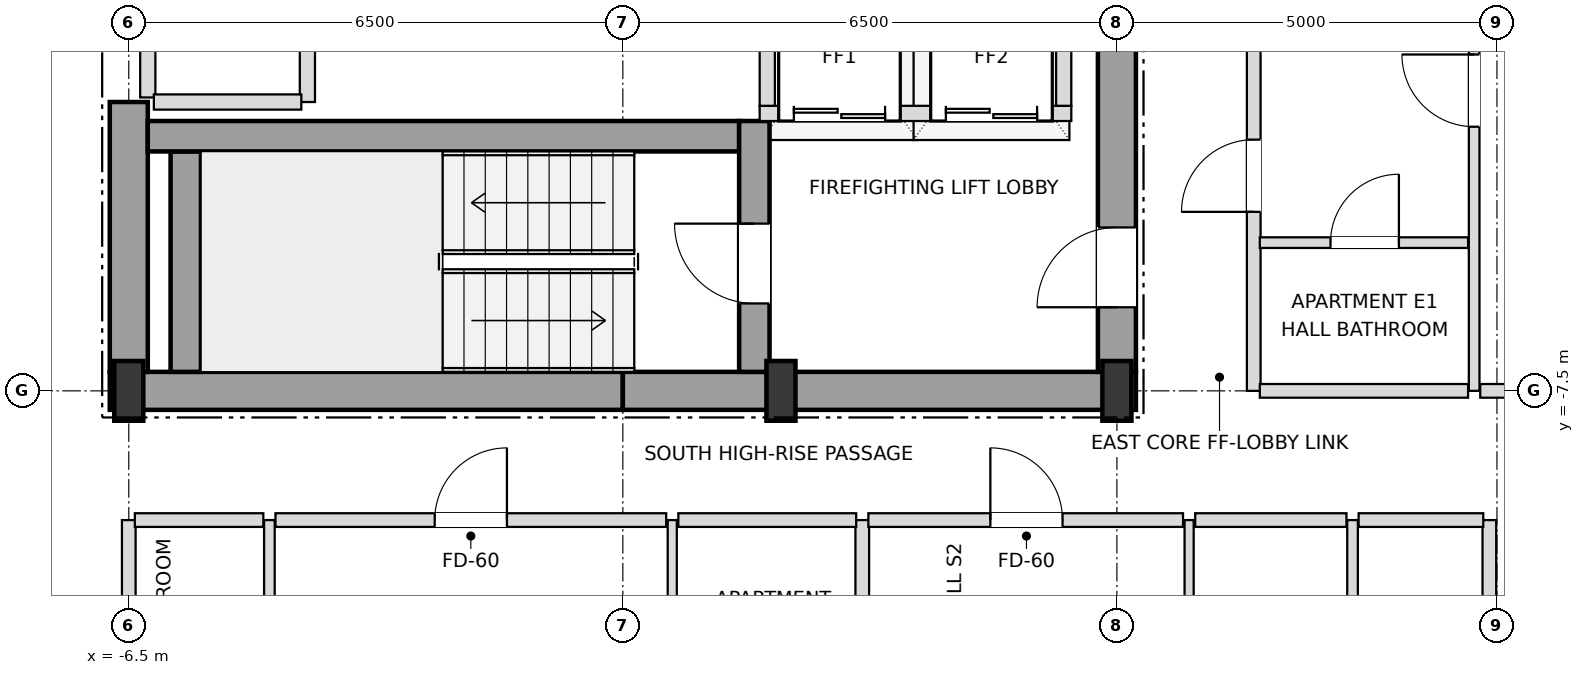
"""IFC4 building model, lengths in metres.
Left out: names, types, materials, properties, quantities, classifications, styles, units other than length and angle.
Written with IfcOpenShell. Run it as: python <this file> out.ifc"""

import sys

from ifc_helpers import new_model, si_unit, direction, frame, frame_2d, origin, origin_2d, place, context, subcontext, project, spatial, rectangle, i_section, extrude, element, fill, save


model = new_model("IFC4")
c1 = context("Model", 3, precision=1e-05, world=origin(), true_north=direction((0.0, 1.0)))
c2 = subcontext(c1, "Body", "Model", "MODEL_VIEW")
j1 = project(units=[si_unit("LENGTHUNIT", "METRE"), si_unit("PLANEANGLEUNIT", "RADIAN")], contexts=[c1])
p1 = place(None, origin())
s1 = spatial("IfcSite", under=j1, at=p1, CompositionType="ELEMENT")
p2 = place(p1, origin())
s2 = spatial("IfcBuilding", under=s1, at=p2, CompositionType="ELEMENT")
p3 = place(p2, frame((0.0, 0.0, 240.3)))
s3 = spatial("IfcBuildingStorey", under=s2, at=p3, CompositionType="ELEMENT", Elevation=240.3)
for number, where, z_axis, x_axis in (
    (1, (-6.5, -7.5, 0.0), (0.0, 0.0, 1.0), (1.0, 0.0, 0.0)),
    (2, (2.08, -7.5, 0.0), (0.0, 0.0, 1.0), (1.0, 0.0, 0.0)),
    (3, (6.5, -7.5, 0.0), (0.0, 0.0, 1.0), (1.0, 0.0, 0.0)),
):
    element("IfcColumn", number, at=place(p3, frame(where, z_axis=z_axis, x_axis=x_axis)), inside=s3, PredefinedType="COLUMN", context=c2, shape_type="SweptSolid", body=[
        extrude(i_section(OverallWidth=0.382, OverallDepth=0.786, WebThickness=0.02, FlangeThickness=0.033, at=origin_2d()), origin(), (0.0, 0.0, 1.0), 3.6),
    ])
for number, where, z_axis, x_axis in (
    (4, (-6.75, -7.5, 0.0), (0.0, 0.0, 1.0), (1.0, 0.0, 0.0)),
    (5, (0.0, -7.5, 0.0), (0.0, 0.0, 1.0), (1.0, 0.0, 0.0)),
):
    element("IfcWall", number, at=place(p3, frame(where, z_axis=z_axis, x_axis=x_axis)), inside=s3, PredefinedType="SHEAR", context=c2, shape_type="SweptSolid", body=[
        extrude(rectangle(XDim=6.75, YDim=0.5, at=frame_2d((3.375, 0.0))), origin(), (0.0, 0.0, 1.0), 3.38),
    ])
p4 = place(p3, frame((-6.5, -7.25, 0.0), z_axis=(0.0, 0.0, 1.0), x_axis=(0.0, 1.0, 0.0)))
e6 = element("IfcWall", 6, at=p4, inside=s3, PredefinedType="SHEAR", context=c2, shape_type="SweptSolid", body=[
    extrude(rectangle(XDim=3.55, YDim=0.5, at=frame_2d((1.775, 0.0))), origin(), (0.0, 0.0, 1.0), 3.38),
])
p5 = place(p3, frame((6.5, -7.25, 0.0), z_axis=(0.0, 0.0, 1.0), x_axis=(0.0, 1.0, 0.0)))
e7 = element("IfcWall", 7, at=p5, inside=s3, PredefinedType="SHEAR", context=c2, shape_type="SweptSolid", body=[
    extrude(rectangle(XDim=5.75, YDim=0.5, at=frame_2d((2.875, 0.0))), origin(), (0.0, 0.0, 1.0), 3.38),
])
p6 = place(p5, frame((0.85, 0.0, 0.0)))
e8 = element("IfcOpeningElement", 8, at=p6, cuts=e7, PredefinedType="OPENING", context=c2, shape_type="SweptSolid", body=[
    extrude(rectangle(XDim=1.05, YDim=2.15, at=frame_2d((0.525, 1.075))), frame((0.0, 0.26, 0.0), z_axis=(0.0, -1.0, 0.0), x_axis=(1.0, 0.0, 0.0)), (0.0, 0.0, 1.0), 0.52),
])
p7 = place(p3, frame((-5.75, -7.25, 0.0), z_axis=(0.0, 0.0, 1.0), x_axis=(0.0, 1.0, 0.0)))
e9 = element("IfcWall", 9, at=p7, inside=s3, PredefinedType="SHEAR", context=c2, shape_type="SweptSolid", body=[
    extrude(rectangle(XDim=2.9, YDim=0.4, at=frame_2d((1.45, 0.0))), origin(), (0.0, 0.0, 1.0), 3.38),
])
p8 = place(p3, frame((-6.25, -4.15, 0.0), z_axis=(0.0, 0.0, 1.0), x_axis=(1.0, 0.0, 0.0)))
e10 = element("IfcWall", 10, at=p8, inside=s3, PredefinedType="SHEAR", context=c2, shape_type="SweptSolid", body=[
    extrude(rectangle(XDim=7.78, YDim=0.4, at=frame_2d((3.89, 0.0))), origin(), (0.0, 0.0, 1.0), 3.38),
])
p9 = place(p3, frame((1.73, -7.25, 0.0), z_axis=(0.0, 0.0, 1.0), x_axis=(0.0, 1.0, 0.0)))
e11 = element("IfcWall", 11, at=p9, inside=s3, PredefinedType="SHEAR", context=c2, shape_type="SweptSolid", body=[
    extrude(rectangle(XDim=3.3, YDim=0.4, at=frame_2d((1.65, 0.0))), origin(), (0.0, 0.0, 1.0), 3.38),
])
p10 = place(p9, frame((0.9, 0.0, 0.0)))
e12 = element("IfcOpeningElement", 12, at=p10, cuts=e11, PredefinedType="OPENING", context=c2, shape_type="SweptSolid", body=[
    extrude(rectangle(XDim=1.05, YDim=2.15, at=frame_2d((0.525, 1.075))), frame((0.0, 0.21, 0.0), z_axis=(0.0, -1.0, 0.0), x_axis=(1.0, 0.0, 0.0)), (0.0, 0.0, 1.0), 0.42),
])
p11 = place(p3, frame((1.8, -3.85, 0.0), z_axis=(0.0, 0.0, 1.0), x_axis=(1.0, 0.0, 0.0)))
e13 = element("IfcWall", 13, at=p11, inside=s3, PredefinedType="SOLIDWALL", context=c2, shape_type="SweptSolid", body=[
    extrude(rectangle(XDim=4.1, YDim=0.2, at=frame_2d((2.05, 0.0))), origin(), (0.0, 0.0, 1.0), 3.38),
])
p12 = place(p11, frame((0.45, 0.0, 0.0)))
e14 = element("IfcOpeningElement", 14, at=p12, cuts=e13, PredefinedType="OPENING", context=c2, shape_type="SweptSolid", body=[
    extrude(rectangle(XDim=1.2, YDim=2.2, at=frame_2d((0.6, 1.1))), frame((0.0, 0.11, 0.0), z_axis=(0.0, -1.0, 0.0), x_axis=(1.0, 0.0, 0.0)), (0.0, 0.0, 1.0), 0.22),
])
p13 = place(p11, frame((2.45, 0.0, 0.0)))
e15 = element("IfcOpeningElement", 15, at=p13, cuts=e13, PredefinedType="OPENING", context=c2, shape_type="SweptSolid", body=[
    extrude(rectangle(XDim=1.2, YDim=2.2, at=frame_2d((0.6, 1.1))), frame((0.0, 0.11, 0.0), z_axis=(0.0, -1.0, 0.0), x_axis=(1.0, 0.0, 0.0)), (0.0, 0.0, 1.0), 0.22),
])
for number, where, z_axis, x_axis in (
    (16, (1.9, -3.75, 0.0), (0.0, 0.0, 1.0), (0.0, 1.0, 0.0)),
    (17, (5.8, -3.75, 0.0), (0.0, 0.0, 1.0), (0.0, 1.0, 0.0)),
):
    element("IfcWall", number, at=place(p3, frame(where, z_axis=z_axis, x_axis=x_axis)), inside=s3, PredefinedType="SOLIDWALL", context=c2, shape_type="SweptSolid", body=[
        extrude(rectangle(XDim=2.0, YDim=0.2, at=frame_2d((1.0, 0.0))), origin(), (0.0, 0.0, 1.0), 3.38),
    ])
p14 = place(p3, frame((-6.5, -19.9, 0.0), z_axis=(0.0, 0.0, 1.0), x_axis=(0.0, 1.0, 0.0)))
e18 = element("IfcWall", 18, at=p14, inside=s3, PredefinedType="PARTITIONING", context=c2, shape_type="SweptSolid", body=[
    extrude(rectangle(XDim=10.7, YDim=0.18, at=frame_2d((5.35, 0.0))), origin(), (0.0, 0.0, 1.0), 2.826),
])
p15 = place(p3, frame((-6.25, -3.64, 0.0), z_axis=(0.0, 0.0, 1.0), x_axis=(0.0, 1.0, 0.0)))
e19 = element("IfcWall", 19, at=p15, inside=s3, PredefinedType="SOLIDWALL", context=c2, shape_type="SweptSolid", body=[
    extrude(rectangle(XDim=7.34, YDim=0.2, at=frame_2d((3.67, 0.0))), origin(), (0.0, 0.0, 1.0), 3.38),
])
p16 = place(p3, frame((-4.65, -13.9, 0.0), z_axis=(0.0, 0.0, 1.0), x_axis=(0.0, 1.0, 0.0)))
e20 = element("IfcWall", 20, at=p16, inside=s3, PredefinedType="PARTITIONING", context=c2, shape_type="SweptSolid", body=[
    extrude(rectangle(XDim=4.7, YDim=0.14, at=frame_2d((2.35, 0.0))), origin(), (0.0, 0.0, 1.0), 3.38),
])
p17 = place(p16, frame((1.9, 0.0, 0.0)))
e21 = element("IfcOpeningElement", 21, at=p17, cuts=e20, PredefinedType="OPENING", context=c2, shape_type="SweptSolid", body=[
    extrude(rectangle(XDim=0.9, YDim=2.1, at=frame_2d((0.45, 1.05))), frame((0.0, 0.08, 0.0), z_axis=(0.0, -1.0, 0.0), x_axis=(1.0, 0.0, 0.0)), (0.0, 0.0, 1.0), 0.16),
])
p18 = place(p3, frame((-4.15, -3.7, 0.0), z_axis=(0.0, 0.0, 1.0), x_axis=(0.0, 1.0, 0.0)))
e22 = element("IfcWall", 22, at=p18, inside=s3, PredefinedType="SOLIDWALL", context=c2, shape_type="SweptSolid", body=[
    extrude(rectangle(XDim=7.4, YDim=0.2, at=frame_2d((3.7, 0.0))), origin(), (0.0, 0.0, 1.0), 3.38),
])
p19 = place(p18, frame((2.025, 0.0, 0.0)))
e23 = element("IfcOpeningElement", 23, at=p19, cuts=e22, PredefinedType="OPENING", context=c2, shape_type="SweptSolid", body=[
    extrude(rectangle(XDim=0.95, YDim=2.15, at=frame_2d((0.475, 1.075))), frame((0.0, 0.11, 0.0), z_axis=(0.0, -1.0, 0.0), x_axis=(1.0, 0.0, 0.0)), (0.0, 0.0, 1.0), 0.22),
])
p20 = place(p18, frame((5.775, 0.0, 0.0)))
e24 = element("IfcOpeningElement", 24, at=p20, cuts=e22, PredefinedType="OPENING", context=c2, shape_type="SweptSolid", body=[
    extrude(rectangle(XDim=0.95, YDim=2.15, at=frame_2d((0.475, 1.075))), frame((0.0, 0.11, 0.0), z_axis=(0.0, -1.0, 0.0), x_axis=(1.0, 0.0, 0.0)), (0.0, 0.0, 1.0), 0.22),
])
p21 = place(p3, frame((0.65, -13.9, 0.0), z_axis=(0.0, 0.0, 1.0), x_axis=(0.0, 1.0, 0.0)))
e25 = element("IfcWall", 25, at=p21, inside=s3, PredefinedType="PARTITIONING", context=c2, shape_type="SweptSolid", body=[
    extrude(rectangle(XDim=4.7, YDim=0.12, at=frame_2d((2.35, 0.0))), origin(), (0.0, 0.0, 1.0), 3.38),
])
p22 = place(p21, frame((1.875, 0.0, 0.0)))
e26 = element("IfcOpeningElement", 26, at=p22, cuts=e25, PredefinedType="OPENING", context=c2, shape_type="SweptSolid", body=[
    extrude(rectangle(XDim=0.95, YDim=2.1, at=frame_2d((0.475, 1.05))), frame((0.0, 0.07, 0.0), z_axis=(0.0, -1.0, 0.0), x_axis=(1.0, 0.0, 0.0)), (0.0, 0.0, 1.0), 0.14),
])
p23 = place(p3, frame((3.15, -19.9, 0.0), z_axis=(0.0, 0.0, 1.0), x_axis=(0.0, 1.0, 0.0)))
e27 = element("IfcWall", 27, at=p23, inside=s3, PredefinedType="PARTITIONING", context=c2, shape_type="SweptSolid", body=[
    extrude(rectangle(XDim=10.7, YDim=0.18, at=frame_2d((5.35, 0.0))), origin(), (0.0, 0.0, 1.0), 3.018),
])
p24 = place(p3, frame((7.45, -19.9, 0.0), z_axis=(0.0, 0.0, 1.0), x_axis=(0.0, 1.0, 0.0)))
e28 = element("IfcWall", 28, at=p24, inside=s3, PredefinedType="PARTITIONING", context=c2, shape_type="SweptSolid", body=[
    extrude(rectangle(XDim=10.7, YDim=0.12, at=frame_2d((5.35, 0.0))), origin(), (0.0, 0.0, 1.0), 2.826),
])
p25 = place(p24, frame((7.875, 0.0, 0.0)))
e29 = element("IfcOpeningElement", 29, at=p25, cuts=e28, PredefinedType="OPENING", context=c2, shape_type="SweptSolid", body=[
    extrude(rectangle(XDim=0.95, YDim=2.1, at=frame_2d((0.475, 1.05))), frame((0.0, 0.07, 0.0), z_axis=(0.0, -1.0, 0.0), x_axis=(1.0, 0.0, 0.0)), (0.0, 0.0, 1.0), 0.14),
])
p26 = place(p24, frame((2.55, 0.0, 0.0)))
e30 = element("IfcOpeningElement", 30, at=p26, cuts=e28, PredefinedType="OPENING", context=c2, shape_type="SweptSolid", body=[
    extrude(rectangle(XDim=0.9, YDim=2.1, at=frame_2d((0.45, 1.05))), frame((0.0, 0.07, 0.0), z_axis=(0.0, -1.0, 0.0), x_axis=(1.0, 0.0, 0.0)), (0.0, 0.0, 1.0), 0.14),
])
p27 = place(p3, frame((8.3, -7.5, 0.0), z_axis=(0.0, 0.0, 1.0), x_axis=(0.0, 1.0, 0.0)))
e31 = element("IfcWall", 31, at=p27, inside=s3, PredefinedType="PARTITIONING", context=c2, shape_type="SweptSolid", body=[
    extrude(rectangle(XDim=15.0, YDim=0.18, at=frame_2d((7.5, 0.0))), origin(), (0.0, 0.0, 1.0), 3.38),
])
p28 = place(p27, frame((2.355, 0.0, 0.0)))
e32 = element("IfcOpeningElement", 32, at=p28, cuts=e31, PredefinedType="OPENING", context=c2, shape_type="SweptSolid", body=[
    extrude(rectangle(XDim=0.95, YDim=2.15, at=frame_2d((0.475, 1.075))), frame((0.0, 0.1, 0.0), z_axis=(0.0, -1.0, 0.0), x_axis=(1.0, 0.0, 0.0)), (0.0, 0.0, 1.0), 0.2),
])
p29 = place(p3, frame((9.6, -13.9, 0.0), z_axis=(0.0, 0.0, 1.0), x_axis=(0.0, 1.0, 0.0)))
e33 = element("IfcWall", 33, at=p29, inside=s3, PredefinedType="PARTITIONING", context=c2, shape_type="SweptSolid", body=[
    extrude(rectangle(XDim=4.7, YDim=0.14, at=frame_2d((2.35, 0.0))), origin(), (0.0, 0.0, 1.0), 2.826),
])
p30 = place(p29, frame((1.9, 0.0, 0.0)))
e34 = element("IfcOpeningElement", 34, at=p30, cuts=e33, PredefinedType="OPENING", context=c2, shape_type="SweptSolid", body=[
    extrude(rectangle(XDim=0.9, YDim=2.1, at=frame_2d((0.45, 1.05))), frame((0.0, 0.08, 0.0), z_axis=(0.0, -1.0, 0.0), x_axis=(1.0, 0.0, 0.0)), (0.0, 0.0, 1.0), 0.16),
])
p31 = place(p3, frame((11.2, -7.5, 0.0), z_axis=(0.0, 0.0, 1.0), x_axis=(0.0, 1.0, 0.0)))
e35 = element("IfcWall", 35, at=p31, inside=s3, PredefinedType="PARTITIONING", context=c2, shape_type="SweptSolid", body=[
    extrude(rectangle(XDim=15.0, YDim=0.14, at=frame_2d((7.5, 0.0))), origin(), (0.0, 0.0, 1.0), 3.38),
])
p32 = place(p31, frame((3.475, 0.0, 0.0)))
e36 = element("IfcOpeningElement", 36, at=p32, cuts=e35, PredefinedType="OPENING", context=c2, shape_type="SweptSolid", body=[
    extrude(rectangle(XDim=0.95, YDim=2.1, at=frame_2d((0.475, 1.05))), frame((0.0, 0.08, 0.0), z_axis=(0.0, -1.0, 0.0), x_axis=(1.0, 0.0, 0.0)), (0.0, 0.0, 1.0), 0.16),
])
p33 = place(p3, frame((11.4, -14.27, 0.0), z_axis=(0.0, 0.0, 1.0), x_axis=(0.0, 1.0, 0.0)))
e37 = element("IfcWall", 37, at=p33, inside=s3, PredefinedType="PARTITIONING", context=c2, shape_type="SweptSolid", body=[
    extrude(rectangle(XDim=5.07, YDim=0.18, at=frame_2d((2.535, 0.0))), origin(), (0.0, 0.0, 1.0), 2.748),
])
p34 = place(p3, frame((-6.42, -9.2, 0.0), z_axis=(0.0, 0.0, 1.0), x_axis=(1.0, 0.0, 0.0)))
e38 = element("IfcWall", 38, at=p34, inside=s3, PredefinedType="PARTITIONING", context=c2, shape_type="SweptSolid", body=[
    extrude(rectangle(XDim=1.69, YDim=0.18, at=frame_2d((0.845, 0.0))), origin(), (0.0, 0.0, 1.0), 3.38),
])
p35 = place(p3, frame((-4.57, -9.2, 0.0), z_axis=(0.0, 0.0, 1.0), x_axis=(1.0, 0.0, 0.0)))
e39 = element("IfcWall", 39, at=p35, inside=s3, PredefinedType="PARTITIONING", context=c2, shape_type="SweptSolid", body=[
    extrude(rectangle(XDim=5.14, YDim=0.18, at=frame_2d((2.57, 0.0))), origin(), (0.0, 0.0, 1.0), 3.38),
])
p36 = place(p35, frame((2.095, 0.0, 0.0)))
e40 = element("IfcOpeningElement", 40, at=p36, cuts=e39, PredefinedType="OPENING", context=c2, shape_type="SweptSolid", body=[
    extrude(rectangle(XDim=0.95, YDim=2.15, at=frame_2d((0.475, 1.075))), frame((0.0, 0.1, 0.0), z_axis=(0.0, -1.0, 0.0), x_axis=(1.0, 0.0, 0.0)), (0.0, 0.0, 1.0), 0.2),
])
p37 = place(p3, frame((0.73, -9.2, 0.0), z_axis=(0.0, 0.0, 1.0), x_axis=(1.0, 0.0, 0.0)))
e41 = element("IfcWall", 41, at=p37, inside=s3, PredefinedType="PARTITIONING", context=c2, shape_type="SweptSolid", body=[
    extrude(rectangle(XDim=2.34, YDim=0.18, at=frame_2d((1.17, 0.0))), origin(), (0.0, 0.0, 1.0), 3.38),
])
p38 = place(p3, frame((3.23, -9.2, 0.0), z_axis=(0.0, 0.0, 1.0), x_axis=(1.0, 0.0, 0.0)))
e42 = element("IfcWall", 42, at=p38, inside=s3, PredefinedType="PARTITIONING", context=c2, shape_type="SweptSolid", body=[
    extrude(rectangle(XDim=4.14, YDim=0.18, at=frame_2d((2.07, 0.0))), origin(), (0.0, 0.0, 1.0), 2.826),
])
p39 = place(p38, frame((1.605, 0.0, 0.0)))
e43 = element("IfcOpeningElement", 43, at=p39, cuts=e42, PredefinedType="OPENING", context=c2, shape_type="SweptSolid", body=[
    extrude(rectangle(XDim=0.95, YDim=2.15, at=frame_2d((0.475, 1.075))), frame((0.0, 0.1, 0.0), z_axis=(0.0, -1.0, 0.0), x_axis=(1.0, 0.0, 0.0)), (0.0, 0.0, 1.0), 0.2),
])
p40 = place(p3, frame((7.53, -9.2, 0.0), z_axis=(0.0, 0.0, 1.0), x_axis=(1.0, 0.0, 0.0)))
e44 = element("IfcWall", 44, at=p40, inside=s3, PredefinedType="PARTITIONING", context=c2, shape_type="SweptSolid", body=[
    extrude(rectangle(XDim=1.99, YDim=0.18, at=frame_2d((0.995, 0.0))), origin(), (0.0, 0.0, 1.0), 3.38),
])
p41 = place(p3, frame((9.68, -9.2, 0.0), z_axis=(0.0, 0.0, 1.0), x_axis=(1.0, 0.0, 0.0)))
e45 = element("IfcWall", 45, at=p41, inside=s3, PredefinedType="PARTITIONING", context=c2, shape_type="SweptSolid", body=[
    extrude(rectangle(XDim=1.64, YDim=0.18, at=frame_2d((0.82, 0.0))), origin(), (0.0, 0.0, 1.0), 3.38),
])
p42 = place(p3, frame((8.38, -7.5, 0.0), z_axis=(0.0, 0.0, 1.0), x_axis=(1.0, 0.0, 0.0)))
e46 = element("IfcWall", 46, at=p42, inside=s3, PredefinedType="PARTITIONING", context=c2, shape_type="SweptSolid", body=[
    extrude(rectangle(XDim=2.74, YDim=0.18, at=frame_2d((1.37, 0.0))), origin(), (0.0, 0.0, 1.0), 2.826),
])
p43 = place(p3, frame((11.28, -7.5, 0.0), z_axis=(0.0, 0.0, 1.0), x_axis=(1.0, 0.0, 0.0)))
e47 = element("IfcWall", 47, at=p43, inside=s3, PredefinedType="PARTITIONING", context=c2, shape_type="SweptSolid", body=[
    extrude(rectangle(XDim=5.62, YDim=0.18, at=frame_2d((2.81, 0.0))), origin(), (0.0, 0.0, 1.0), 2.826),
])
p44 = place(p3, frame((8.38, -5.55, 0.0), z_axis=(0.0, 0.0, 1.0), x_axis=(1.0, 0.0, 0.0)))
e48 = element("IfcWall", 48, at=p44, inside=s3, PredefinedType="PARTITIONING", context=c2, shape_type="SweptSolid", body=[
    extrude(rectangle(XDim=2.74, YDim=0.14, at=frame_2d((1.37, 0.0))), origin(), (0.0, 0.0, 1.0), 3.38),
])
p45 = place(p44, frame((0.93, 0.0, 0.0)))
e49 = element("IfcOpeningElement", 49, at=p45, cuts=e48, PredefinedType="OPENING", context=c2, shape_type="SweptSolid", body=[
    extrude(rectangle(XDim=0.9, YDim=2.1, at=frame_2d((0.45, 1.05))), frame((0.0, 0.08, 0.0), z_axis=(0.0, -1.0, 0.0), x_axis=(1.0, 0.0, 0.0)), (0.0, 0.0, 1.0), 0.16),
])
p46 = place(p3, frame((-6.17, -3.7, 0.0), z_axis=(0.0, 0.0, 1.0), x_axis=(1.0, 0.0, 0.0)))
e50 = element("IfcWall", 50, at=p46, inside=s3, PredefinedType="SOLIDWALL", context=c2, shape_type="SweptSolid", body=[
    extrude(rectangle(XDim=1.94, YDim=0.2, at=frame_2d((0.97, 0.0))), origin(), (0.0, 0.0, 1.0), 3.38),
])
p47 = place(p6, origin())
e51 = element("IfcDoor", 51, at=p47, inside=s3, OperationType="SINGLE_SWING_LEFT", PredefinedType="DOOR", context=c2, shape_type="SweptSolid", body=[
    extrude(rectangle(XDim=1.05, YDim=2.15, at=frame_2d((0.525, 1.075))), frame((0.0, 0.025, 0.0), z_axis=(0.0, -1.0, 0.0), x_axis=(1.0, 0.0, 0.0)), (0.0, 0.0, 1.0), 0.05),
])
fill(e8, e51)
p48 = place(p10, origin())
e52 = element("IfcDoor", 52, at=p48, inside=s3, OperationType="SINGLE_SWING_RIGHT", PredefinedType="DOOR", context=c2, shape_type="SweptSolid", body=[
    extrude(rectangle(XDim=1.05, YDim=2.15, at=frame_2d((0.525, 1.075))), frame((0.0, 0.025, 0.0), z_axis=(0.0, -1.0, 0.0), x_axis=(1.0, 0.0, 0.0)), (0.0, 0.0, 1.0), 0.05),
])
fill(e12, e52)
p49 = place(p12, origin())
e53 = element("IfcDoor", 53, at=p49, inside=s3, OperationType="DOUBLE_DOOR_SLIDING", PredefinedType="DOOR", context=c2, shape_type="SweptSolid", body=[
    extrude(rectangle(XDim=1.2, YDim=2.2, at=frame_2d((0.6, 1.1))), frame((0.0, 0.025, 0.0), z_axis=(0.0, -1.0, 0.0), x_axis=(1.0, 0.0, 0.0)), (0.0, 0.0, 1.0), 0.05),
])
fill(e14, e53)
p50 = place(p13, origin())
e54 = element("IfcDoor", 54, at=p50, inside=s3, OperationType="DOUBLE_DOOR_SLIDING", PredefinedType="DOOR", context=c2, shape_type="SweptSolid", body=[
    extrude(rectangle(XDim=1.2, YDim=2.2, at=frame_2d((0.6, 1.1))), frame((0.0, 0.025, 0.0), z_axis=(0.0, -1.0, 0.0), x_axis=(1.0, 0.0, 0.0)), (0.0, 0.0, 1.0), 0.05),
])
fill(e15, e54)
p51 = place(p36, origin())
e55 = element("IfcDoor", 55, at=p51, inside=s3, OperationType="SINGLE_SWING_RIGHT", PredefinedType="DOOR", context=c2, shape_type="SweptSolid", body=[
    extrude(rectangle(XDim=0.95, YDim=2.15, at=frame_2d((0.475, 1.075))), frame((0.0, 0.025, 0.0), z_axis=(0.0, -1.0, 0.0), x_axis=(1.0, 0.0, 0.0)), (0.0, 0.0, 1.0), 0.05),
])
fill(e40, e55)
p52 = place(p39, origin())
e56 = element("IfcDoor", 56, at=p52, inside=s3, OperationType="SINGLE_SWING_LEFT", PredefinedType="DOOR", context=c2, shape_type="SweptSolid", body=[
    extrude(rectangle(XDim=0.95, YDim=2.15, at=frame_2d((0.475, 1.075))), frame((0.0, 0.025, 0.0), z_axis=(0.0, -1.0, 0.0), x_axis=(1.0, 0.0, 0.0)), (0.0, 0.0, 1.0), 0.05),
])
fill(e43, e56)
p53 = place(p45, origin())
e57 = element("IfcDoor", 57, at=p53, inside=s3, OperationType="SINGLE_SWING_RIGHT", PredefinedType="DOOR", context=c2, shape_type="SweptSolid", body=[
    extrude(rectangle(XDim=0.9, YDim=2.1, at=frame_2d((0.45, 1.05))), frame((0.0, 0.025, 0.0), z_axis=(0.0, -1.0, 0.0), x_axis=(1.0, 0.0, 0.0)), (0.0, 0.0, 1.0), 0.05),
])
fill(e49, e57)
p54 = place(p28, origin())
e58 = element("IfcDoor", 58, at=p54, inside=s3, OperationType="SINGLE_SWING_LEFT", PredefinedType="DOOR", context=c2, shape_type="SweptSolid", body=[
    extrude(rectangle(XDim=0.95, YDim=2.15, at=frame_2d((0.475, 1.075))), frame((0.0, 0.025, 0.0), z_axis=(0.0, -1.0, 0.0), x_axis=(1.0, 0.0, 0.0)), (0.0, 0.0, 1.0), 0.05),
])
fill(e32, e58)
p55 = place(p32, origin())
e59 = element("IfcDoor", 59, at=p55, inside=s3, OperationType="SINGLE_SWING_RIGHT", PredefinedType="DOOR", context=c2, shape_type="SweptSolid", body=[
    extrude(rectangle(XDim=0.95, YDim=2.1, at=frame_2d((0.475, 1.05))), frame((0.0, 0.025, 0.0), z_axis=(0.0, -1.0, 0.0), x_axis=(1.0, 0.0, 0.0)), (0.0, 0.0, 1.0), 0.05),
])
fill(e36, e59)
save(model, sys.argv[1])
